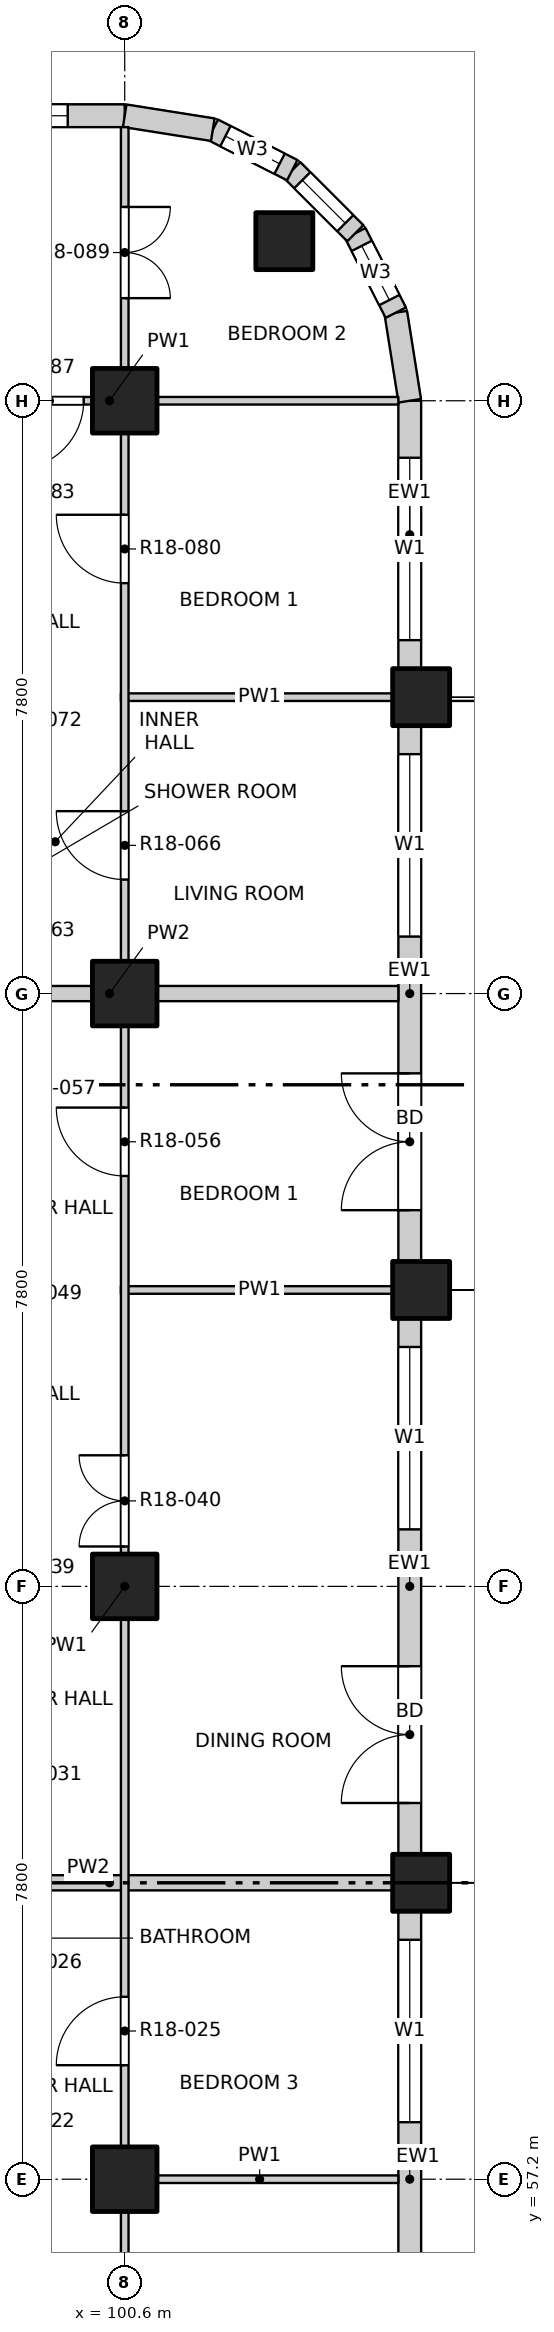
"""IFC4 building model, lengths in metres.
Left out: names, types, materials, properties, quantities, classifications, styles, units other than length and angle.
Written with IfcOpenShell. Run it as: python <this file> out.ifc"""

import sys

from ifc_helpers import new_model, si_unit, direction, frame, frame_2d, origin, origin_2d, place, context, subcontext, project, spatial, rectangle, extrude, element, fill, save


model = new_model("IFC4")
c1 = context("Model", 3, precision=1e-05, world=origin(), true_north=direction((0.0, 1.0)))
c2 = subcontext(c1, "Body", "Model", "MODEL_VIEW")
j1 = project(units=[si_unit("LENGTHUNIT", "METRE"), si_unit("PLANEANGLEUNIT", "RADIAN")], contexts=[c1])
p1 = place(None, origin())
s1 = spatial("IfcSite", under=j1, at=p1, CompositionType="ELEMENT")
p2 = place(p1, origin())
s2 = spatial("IfcBuilding", under=s1, at=p2, CompositionType="ELEMENT")
p3 = place(p2, frame((0.0, 0.0, 189.4)))
s3 = spatial("IfcBuildingStorey", under=s2, at=p3, CompositionType="ELEMENT", Elevation=189.4)
for number, where, z_axis, x_axis in (
    (1, (102.7, 82.7, -0.25), (0.0, 0.0, 1.0), (1.0, 0.0, 0.0)),
    (2, (104.5, 61.1, -0.25), (0.0, 0.0, 1.0), (1.0, 0.0, 0.0)),
    (3, (104.5, 68.9, -0.25), (0.0, 0.0, 1.0), (1.0, 0.0, 0.0)),
    (4, (104.5, 76.7, -0.25), (0.0, 0.0, 1.0), (1.0, 0.0, 0.0)),
):
    element("IfcColumn", number, at=place(p3, frame(where, z_axis=z_axis, x_axis=x_axis)), inside=s3, PredefinedType="COLUMN", context=c2, shape_type="SweptSolid", body=[
        extrude(rectangle(XDim=0.75, YDim=0.75, at=origin_2d()), origin(), (0.0, 0.0, 1.0), 3.35),
    ])
for number, where, z_axis, x_axis in (
    (5, (100.6, 57.2, -0.25), (0.0, 0.0, 1.0), (1.0, 0.0, 0.0)),
    (6, (100.6, 65.0, -0.25), (0.0, 0.0, 1.0), (1.0, 0.0, 0.0)),
    (7, (100.6, 72.8, -0.25), (0.0, 0.0, 1.0), (1.0, 0.0, 0.0)),
    (8, (100.6, 80.6, -0.25), (0.0, 0.0, 1.0), (1.0, 0.0, 0.0)),
):
    element("IfcColumn", number, at=place(p3, frame(where, z_axis=z_axis, x_axis=x_axis)), inside=s3, PredefinedType="COLUMN", context=c2, shape_type="SweptSolid", body=[
        extrude(rectangle(XDim=0.85, YDim=0.85, at=origin_2d()), origin(), (0.0, 0.0, 1.0), 3.35),
    ])
p4 = place(p3, frame((104.35, 53.675, 0.0), z_axis=(0.0, 0.0, 1.0), x_axis=(0.0, 1.0, 0.0)))
e9 = element("IfcWall", 9, at=p4, inside=s3, PredefinedType="SOLIDWALL", context=c2, shape_type="SweptSolid", body=[
    extrude(rectangle(XDim=7.05, YDim=0.3, at=frame_2d((3.525, 0.0))), origin(), (0.0, 0.0, 1.0), 3.1),
])
p5 = place(p4, frame((0.675, 0.0, 0.0)))
e10 = element("IfcOpeningElement", 10, at=p5, cuts=e9, PredefinedType="OPENING", context=c2, shape_type="SweptSolid", body=[
    extrude(rectangle(XDim=1.8, YDim=2.4, at=frame_2d((0.9, 1.2))), frame((0.0, 0.16, 0.0), z_axis=(0.0, -1.0, 0.0), x_axis=(1.0, 0.0, 0.0)), (0.0, 0.0, 1.0), 0.32),
])
p6 = place(p4, frame((4.275, 0.0, 0.9)))
e11 = element("IfcOpeningElement", 11, at=p6, cuts=e9, PredefinedType="OPENING", context=c2, shape_type="SweptSolid", body=[
    extrude(rectangle(XDim=2.4, YDim=1.8, at=frame_2d((1.2, 0.9))), frame((0.0, 0.16, 0.0), z_axis=(0.0, -1.0, 0.0), x_axis=(1.0, 0.0, 0.0)), (0.0, 0.0, 1.0), 0.32),
])
p7 = place(p3, frame((104.35, 61.475, 0.0), z_axis=(0.0, 0.0, 1.0), x_axis=(0.0, 1.0, 0.0)))
e12 = element("IfcWall", 12, at=p7, inside=s3, PredefinedType="SOLIDWALL", context=c2, shape_type="SweptSolid", body=[
    extrude(rectangle(XDim=7.05, YDim=0.3, at=frame_2d((3.525, 0.0))), origin(), (0.0, 0.0, 1.0), 3.1),
])
p8 = place(p7, frame((0.675, 0.0, 0.0)))
e13 = element("IfcOpeningElement", 13, at=p8, cuts=e12, PredefinedType="OPENING", context=c2, shape_type="SweptSolid", body=[
    extrude(rectangle(XDim=1.8, YDim=2.4, at=frame_2d((0.9, 1.2))), frame((0.0, 0.16, 0.0), z_axis=(0.0, -1.0, 0.0), x_axis=(1.0, 0.0, 0.0)), (0.0, 0.0, 1.0), 0.32),
])
p9 = place(p7, frame((4.275, 0.0, 0.9)))
e14 = element("IfcOpeningElement", 14, at=p9, cuts=e12, PredefinedType="OPENING", context=c2, shape_type="SweptSolid", body=[
    extrude(rectangle(XDim=2.4, YDim=1.8, at=frame_2d((1.2, 0.9))), frame((0.0, 0.16, 0.0), z_axis=(0.0, -1.0, 0.0), x_axis=(1.0, 0.0, 0.0)), (0.0, 0.0, 1.0), 0.32),
])
p10 = place(p3, frame((104.35, 69.275, 0.0), z_axis=(0.0, 0.0, 1.0), x_axis=(0.0, 1.0, 0.0)))
e15 = element("IfcWall", 15, at=p10, inside=s3, PredefinedType="SOLIDWALL", context=c2, shape_type="SweptSolid", body=[
    extrude(rectangle(XDim=7.05, YDim=0.3, at=frame_2d((3.525, 0.0))), origin(), (0.0, 0.0, 1.0), 3.1),
])
p11 = place(p10, frame((0.675, 0.0, 0.0)))
e16 = element("IfcOpeningElement", 16, at=p11, cuts=e15, PredefinedType="OPENING", context=c2, shape_type="SweptSolid", body=[
    extrude(rectangle(XDim=1.8, YDim=2.4, at=frame_2d((0.9, 1.2))), frame((0.0, 0.16, 0.0), z_axis=(0.0, -1.0, 0.0), x_axis=(1.0, 0.0, 0.0)), (0.0, 0.0, 1.0), 0.32),
])
p12 = place(p10, frame((4.275, 0.0, 0.9)))
e17 = element("IfcOpeningElement", 17, at=p12, cuts=e15, PredefinedType="OPENING", context=c2, shape_type="SweptSolid", body=[
    extrude(rectangle(XDim=2.4, YDim=1.8, at=frame_2d((1.2, 0.9))), frame((0.0, 0.16, 0.0), z_axis=(0.0, -1.0, 0.0), x_axis=(1.0, 0.0, 0.0)), (0.0, 0.0, 1.0), 0.32),
])
p13 = place(p3, frame((104.35, 77.075, 0.0), z_axis=(0.0, 0.0, 1.0), x_axis=(0.0, 1.0, 0.0)))
e18 = element("IfcWall", 18, at=p13, inside=s3, PredefinedType="SOLIDWALL", context=c2, shape_type="SweptSolid", body=[
    extrude(rectangle(XDim=3.525, YDim=0.3, at=frame_2d((1.763, 0.0))), origin(), (0.0, 0.0, 1.0), 3.1),
])
p14 = place(p13, frame((0.375, 0.0, 0.9)))
e19 = element("IfcOpeningElement", 19, at=p14, cuts=e18, PredefinedType="OPENING", context=c2, shape_type="SweptSolid", body=[
    extrude(rectangle(XDim=2.4, YDim=1.8, at=frame_2d((1.2, 0.9))), frame((0.0, 0.16, 0.0), z_axis=(0.0, -1.0, 0.0), x_axis=(1.0, 0.0, 0.0)), (0.0, 0.0, 1.0), 0.32),
])
p15 = place(p3, frame((97.075, 84.35, 0.0), z_axis=(0.0, 0.0, 1.0), x_axis=(1.0, 0.0, 0.0)))
e20 = element("IfcWall", 20, at=p15, inside=s3, PredefinedType="SOLIDWALL", context=c2, shape_type="SweptSolid", body=[
    extrude(rectangle(XDim=3.525, YDim=0.3, at=frame_2d((1.763, 0.0))), origin(), (0.0, 0.0, 1.0), 3.1),
])
p16 = place(p15, frame((0.375, 0.0, 0.9)))
e21 = element("IfcOpeningElement", 21, at=p16, cuts=e20, PredefinedType="OPENING", context=c2, shape_type="SweptSolid", body=[
    extrude(rectangle(XDim=2.4, YDim=1.8, at=frame_2d((1.2, 0.9))), frame((0.0, 0.16, 0.0), z_axis=(0.0, -1.0, 0.0), x_axis=(1.0, 0.0, 0.0)), (0.0, 0.0, 1.0), 0.32),
])
p17 = place(p3, frame((104.35, 80.6, 0.0), z_axis=(0.0, 0.0, 1.0), x_axis=(-0.156496880861, 0.987678452879, 0.0)))
e22 = element("IfcWall", 22, at=p17, inside=s3, PredefinedType="SOLIDWALL", context=c2, shape_type="SweptSolid", body=[
    extrude(rectangle(XDim=1.173, YDim=0.3, at=frame_2d((0.586, 0.0))), origin(), (0.0, 0.0, 1.0), 3.1),
])
p18 = place(p3, frame((104.167, 81.759, 0.0), z_axis=(0.0, 0.0, 1.0), x_axis=(-0.454025524128, 0.890988677504, 0.0)))
e23 = element("IfcWall", 23, at=p18, inside=s3, PredefinedType="SOLIDWALL", context=c2, shape_type="SweptSolid", body=[
    extrude(rectangle(XDim=1.173, YDim=0.3, at=frame_2d((0.587, 0.0))), origin(), (0.0, 0.0, 1.0), 3.1),
])
p19 = place(p18, frame((0.187, 0.0, 0.9)))
e24 = element("IfcOpeningElement", 24, at=p19, cuts=e23, PredefinedType="OPENING", context=c2, shape_type="SweptSolid", body=[
    extrude(rectangle(XDim=0.8, YDim=1.2, at=frame_2d((0.4, 0.6))), frame((0.0, 0.16, 0.0), z_axis=(0.0, -1.0, 0.0), x_axis=(1.0, 0.0, 0.0)), (0.0, 0.0, 1.0), 0.32),
])
p20 = place(p3, frame((103.634, 82.804, 0.0), z_axis=(0.0, 0.0, 1.0), x_axis=(-0.707106781187, 0.707106781187, 0.0)))
e25 = element("IfcWall", 25, at=p20, inside=s3, PredefinedType="SOLIDWALL", context=c2, shape_type="SweptSolid", body=[
    extrude(rectangle(XDim=1.173, YDim=0.3, at=frame_2d((0.586, 0.0))), origin(), (0.0, 0.0, 1.0), 3.1),
])
p21 = place(p20, frame((0.187, 0.0, 0.9)))
e26 = element("IfcOpeningElement", 26, at=p21, cuts=e25, PredefinedType="OPENING", context=c2, shape_type="SweptSolid", body=[
    extrude(rectangle(XDim=0.8, YDim=1.2, at=frame_2d((0.4, 0.6))), frame((0.0, 0.16, 0.0), z_axis=(0.0, -1.0, 0.0), x_axis=(1.0, 0.0, 0.0)), (0.0, 0.0, 1.0), 0.32),
])
p22 = place(p3, frame((102.804, 83.634, 0.0), z_axis=(0.0, 0.0, 1.0), x_axis=(-0.890988677504, 0.454025524128, 0.0)))
e27 = element("IfcWall", 27, at=p22, inside=s3, PredefinedType="SOLIDWALL", context=c2, shape_type="SweptSolid", body=[
    extrude(rectangle(XDim=1.173, YDim=0.3, at=frame_2d((0.587, 0.0))), origin(), (0.0, 0.0, 1.0), 3.1),
])
p23 = place(p22, frame((0.187, 0.0, 0.9)))
e28 = element("IfcOpeningElement", 28, at=p23, cuts=e27, PredefinedType="OPENING", context=c2, shape_type="SweptSolid", body=[
    extrude(rectangle(XDim=0.8, YDim=1.2, at=frame_2d((0.4, 0.6))), frame((0.0, 0.16, 0.0), z_axis=(0.0, -1.0, 0.0), x_axis=(1.0, 0.0, 0.0)), (0.0, 0.0, 1.0), 0.32),
])
p24 = place(p3, frame((101.759, 84.167, 0.0), z_axis=(0.0, 0.0, 1.0), x_axis=(-0.987678452879, 0.156496880861, 0.0)))
e29 = element("IfcWall", 29, at=p24, inside=s3, PredefinedType="SOLIDWALL", context=c2, shape_type="SweptSolid", body=[
    extrude(rectangle(XDim=1.173, YDim=0.3, at=frame_2d((0.586, 0.0))), origin(), (0.0, 0.0, 1.0), 3.1),
])
p25 = place(p3, frame((100.55, 57.2, 0.0), z_axis=(0.0, 0.0, 1.0), x_axis=(1.0, 0.0, 0.0)))
e30 = element("IfcWall", 30, at=p25, inside=s3, PredefinedType="PARTITIONING", context=c2, shape_type="SweptSolid", body=[
    extrude(rectangle(XDim=3.65, YDim=0.1, at=frame_2d((1.825, 0.0))), origin(), (0.0, 0.0, 1.0), 3.1),
])
p26 = place(p3, frame((96.6, 61.1, 0.0), z_axis=(0.0, 0.0, 1.0), x_axis=(1.0, 0.0, 0.0)))
e31 = element("IfcWall", 31, at=p26, inside=s3, PredefinedType="PARTITIONING", context=c2, shape_type="SweptSolid", body=[
    extrude(rectangle(XDim=7.6, YDim=0.2, at=frame_2d((3.8, 0.0))), origin(), (0.0, 0.0, 1.0), 3.1),
])
p27 = place(p3, frame((100.55, 68.9, 0.0), z_axis=(0.0, 0.0, 1.0), x_axis=(1.0, 0.0, 0.0)))
e32 = element("IfcWall", 32, at=p27, inside=s3, PredefinedType="PARTITIONING", context=c2, shape_type="SweptSolid", body=[
    extrude(rectangle(XDim=3.65, YDim=0.1, at=frame_2d((1.825, 0.0))), origin(), (0.0, 0.0, 1.0), 3.1),
])
p28 = place(p3, frame((96.6, 72.8, 0.0), z_axis=(0.0, 0.0, 1.0), x_axis=(1.0, 0.0, 0.0)))
e33 = element("IfcWall", 33, at=p28, inside=s3, PredefinedType="PARTITIONING", context=c2, shape_type="SweptSolid", body=[
    extrude(rectangle(XDim=7.6, YDim=0.2, at=frame_2d((3.8, 0.0))), origin(), (0.0, 0.0, 1.0), 3.1),
])
p29 = place(p3, frame((100.55, 76.7, 0.0), z_axis=(0.0, 0.0, 1.0), x_axis=(1.0, 0.0, 0.0)))
e34 = element("IfcWall", 34, at=p29, inside=s3, PredefinedType="PARTITIONING", context=c2, shape_type="SweptSolid", body=[
    extrude(rectangle(XDim=3.65, YDim=0.1, at=frame_2d((1.825, 0.0))), origin(), (0.0, 0.0, 1.0), 3.1),
])
p30 = place(p3, frame((96.6, 80.6, 0.0), z_axis=(0.0, 0.0, 1.0), x_axis=(1.0, 0.0, 0.0)))
e35 = element("IfcWall", 35, at=p30, inside=s3, PredefinedType="PARTITIONING", context=c2, shape_type="SweptSolid", body=[
    extrude(rectangle(XDim=7.6, YDim=0.1, at=frame_2d((3.8, 0.0))), origin(), (0.0, 0.0, 1.0), 3.1),
])
p31 = place(p30, frame((2.56, 0.0, 0.0)))
e36 = element("IfcOpeningElement", 36, at=p31, cuts=e35, PredefinedType="OPENING", context=c2, shape_type="SweptSolid", body=[
    extrude(rectangle(XDim=0.9, YDim=2.1, at=frame_2d((0.45, 1.05))), frame((0.0, 0.06, 0.0), z_axis=(0.0, -1.0, 0.0), x_axis=(1.0, 0.0, 0.0)), (0.0, 0.0, 1.0), 0.12),
])
p32 = place(p3, frame((100.6, 45.8, 0.0), z_axis=(0.0, 0.0, 1.0), x_axis=(0.0, 1.0, 0.0)))
e37 = element("IfcWall", 37, at=p32, inside=s3, PredefinedType="PARTITIONING", context=c2, shape_type="SweptSolid", body=[
    extrude(rectangle(XDim=38.4, YDim=0.1, at=frame_2d((19.2, 0.0))), origin(), (0.0, 0.0, 1.0), 3.1),
])
p33 = place(p32, frame((1.05, 0.0, 0.0)))
e38 = element("IfcOpeningElement", 38, at=p33, cuts=e37, PredefinedType="OPENING", context=c2, shape_type="SweptSolid", body=[
    extrude(rectangle(XDim=1.2, YDim=2.1, at=frame_2d((0.6, 1.05))), frame((0.0, 0.06, 0.0), z_axis=(0.0, -1.0, 0.0), x_axis=(1.0, 0.0, 0.0)), (0.0, 0.0, 1.0), 0.12),
])
p34 = place(p32, frame((5.1, 0.0, 0.0)))
e39 = element("IfcOpeningElement", 39, at=p34, cuts=e37, PredefinedType="OPENING", context=c2, shape_type="SweptSolid", body=[
    extrude(rectangle(XDim=0.9, YDim=2.1, at=frame_2d((0.45, 1.05))), frame((0.0, 0.06, 0.0), z_axis=(0.0, -1.0, 0.0), x_axis=(1.0, 0.0, 0.0)), (0.0, 0.0, 1.0), 0.12),
])
p35 = place(p32, frame((9.0, 0.0, 0.0)))
e40 = element("IfcOpeningElement", 40, at=p35, cuts=e37, PredefinedType="OPENING", context=c2, shape_type="SweptSolid", body=[
    extrude(rectangle(XDim=0.9, YDim=2.1, at=frame_2d((0.45, 1.05))), frame((0.0, 0.06, 0.0), z_axis=(0.0, -1.0, 0.0), x_axis=(1.0, 0.0, 0.0)), (0.0, 0.0, 1.0), 0.12),
])
p36 = place(p32, frame((12.9, 0.0, 0.0)))
e41 = element("IfcOpeningElement", 41, at=p36, cuts=e37, PredefinedType="OPENING", context=c2, shape_type="SweptSolid", body=[
    extrude(rectangle(XDim=0.9, YDim=2.1, at=frame_2d((0.45, 1.05))), frame((0.0, 0.06, 0.0), z_axis=(0.0, -1.0, 0.0), x_axis=(1.0, 0.0, 0.0)), (0.0, 0.0, 1.0), 0.12),
])
p37 = place(p32, frame((19.725, 0.0, 0.0)))
e42 = element("IfcOpeningElement", 42, at=p37, cuts=e37, PredefinedType="OPENING", context=c2, shape_type="SweptSolid", body=[
    extrude(rectangle(XDim=1.2, YDim=2.1, at=frame_2d((0.6, 1.05))), frame((0.0, 0.06, 0.0), z_axis=(0.0, -1.0, 0.0), x_axis=(1.0, 0.0, 0.0)), (0.0, 0.0, 1.0), 0.12),
])
p38 = place(p32, frame((24.6, 0.0, 0.0)))
e43 = element("IfcOpeningElement", 43, at=p38, cuts=e37, PredefinedType="OPENING", context=c2, shape_type="SweptSolid", body=[
    extrude(rectangle(XDim=0.9, YDim=2.1, at=frame_2d((0.45, 1.05))), frame((0.0, 0.06, 0.0), z_axis=(0.0, -1.0, 0.0), x_axis=(1.0, 0.0, 0.0)), (0.0, 0.0, 1.0), 0.12),
])
p39 = place(p32, frame((28.5, 0.0, 0.0)))
e44 = element("IfcOpeningElement", 44, at=p39, cuts=e37, PredefinedType="OPENING", context=c2, shape_type="SweptSolid", body=[
    extrude(rectangle(XDim=0.9, YDim=2.1, at=frame_2d((0.45, 1.05))), frame((0.0, 0.06, 0.0), z_axis=(0.0, -1.0, 0.0), x_axis=(1.0, 0.0, 0.0)), (0.0, 0.0, 1.0), 0.12),
])
p40 = place(p32, frame((32.4, 0.0, 0.0)))
e45 = element("IfcOpeningElement", 45, at=p40, cuts=e37, PredefinedType="OPENING", context=c2, shape_type="SweptSolid", body=[
    extrude(rectangle(XDim=0.9, YDim=2.1, at=frame_2d((0.45, 1.05))), frame((0.0, 0.06, 0.0), z_axis=(0.0, -1.0, 0.0), x_axis=(1.0, 0.0, 0.0)), (0.0, 0.0, 1.0), 0.12),
])
p41 = place(p32, frame((36.15, 0.0, 0.0)))
e46 = element("IfcOpeningElement", 46, at=p41, cuts=e37, PredefinedType="OPENING", context=c2, shape_type="SweptSolid", body=[
    extrude(rectangle(XDim=1.2, YDim=2.1, at=frame_2d((0.6, 1.05))), frame((0.0, 0.06, 0.0), z_axis=(0.0, -1.0, 0.0), x_axis=(1.0, 0.0, 0.0)), (0.0, 0.0, 1.0), 0.12),
])
p42 = place(p6, origin())
e47 = element("IfcWindow", 47, at=p42, inside=s3, PartitioningType="DOUBLE_PANEL_VERTICAL", PredefinedType="WINDOW", context=c2, shape_type="SweptSolid", body=[
    extrude(rectangle(XDim=2.4, YDim=1.8, at=frame_2d((1.2, 0.9))), frame((0.0, 0.03, 0.0), z_axis=(0.0, -1.0, 0.0), x_axis=(1.0, 0.0, 0.0)), (0.0, 0.0, 1.0), 0.06),
])
fill(e11, e47)
p43 = place(p8, origin())
e48 = element("IfcDoor", 48, at=p43, inside=s3, OperationType="DOUBLE_DOOR_SINGLE_SWING", PredefinedType="DOOR", context=c2, shape_type="SweptSolid", body=[
    extrude(rectangle(XDim=1.8, YDim=2.4, at=frame_2d((0.9, 1.2))), frame((0.0, 0.025, 0.0), z_axis=(0.0, -1.0, 0.0), x_axis=(1.0, 0.0, 0.0)), (0.0, 0.0, 1.0), 0.05),
])
fill(e13, e48)
p44 = place(p9, origin())
e49 = element("IfcWindow", 49, at=p44, inside=s3, PartitioningType="DOUBLE_PANEL_VERTICAL", PredefinedType="WINDOW", context=c2, shape_type="SweptSolid", body=[
    extrude(rectangle(XDim=2.4, YDim=1.8, at=frame_2d((1.2, 0.9))), frame((0.0, 0.03, 0.0), z_axis=(0.0, -1.0, 0.0), x_axis=(1.0, 0.0, 0.0)), (0.0, 0.0, 1.0), 0.06),
])
fill(e14, e49)
p45 = place(p11, origin())
e50 = element("IfcDoor", 50, at=p45, inside=s3, OperationType="DOUBLE_DOOR_SINGLE_SWING", PredefinedType="DOOR", context=c2, shape_type="SweptSolid", body=[
    extrude(rectangle(XDim=1.8, YDim=2.4, at=frame_2d((0.9, 1.2))), frame((0.0, 0.025, 0.0), z_axis=(0.0, -1.0, 0.0), x_axis=(1.0, 0.0, 0.0)), (0.0, 0.0, 1.0), 0.05),
])
fill(e16, e50)
p46 = place(p12, origin())
e51 = element("IfcWindow", 51, at=p46, inside=s3, PartitioningType="DOUBLE_PANEL_VERTICAL", PredefinedType="WINDOW", context=c2, shape_type="SweptSolid", body=[
    extrude(rectangle(XDim=2.4, YDim=1.8, at=frame_2d((1.2, 0.9))), frame((0.0, 0.03, 0.0), z_axis=(0.0, -1.0, 0.0), x_axis=(1.0, 0.0, 0.0)), (0.0, 0.0, 1.0), 0.06),
])
fill(e17, e51)
p47 = place(p14, origin())
e52 = element("IfcWindow", 52, at=p47, inside=s3, PartitioningType="DOUBLE_PANEL_VERTICAL", PredefinedType="WINDOW", context=c2, shape_type="SweptSolid", body=[
    extrude(rectangle(XDim=2.4, YDim=1.8, at=frame_2d((1.2, 0.9))), frame((0.0, 0.03, 0.0), z_axis=(0.0, -1.0, 0.0), x_axis=(1.0, 0.0, 0.0)), (0.0, 0.0, 1.0), 0.06),
])
fill(e19, e52)
p48 = place(p16, origin())
e53 = element("IfcWindow", 53, at=p48, inside=s3, PartitioningType="DOUBLE_PANEL_VERTICAL", PredefinedType="WINDOW", context=c2, shape_type="SweptSolid", body=[
    extrude(rectangle(XDim=2.4, YDim=1.8, at=frame_2d((1.2, 0.9))), frame((0.0, 0.03, 0.0), z_axis=(0.0, -1.0, 0.0), x_axis=(1.0, 0.0, 0.0)), (0.0, 0.0, 1.0), 0.06),
])
fill(e21, e53)
p49 = place(p19, origin())
e54 = element("IfcWindow", 54, at=p49, inside=s3, PartitioningType="SINGLE_PANEL", PredefinedType="WINDOW", context=c2, shape_type="SweptSolid", body=[
    extrude(rectangle(XDim=0.8, YDim=1.2, at=frame_2d((0.4, 0.6))), frame((0.0, 0.03, 0.0), z_axis=(0.0, -1.0, 0.0), x_axis=(1.0, 0.0, 0.0)), (0.0, 0.0, 1.0), 0.06),
])
fill(e24, e54)
p50 = place(p21, origin())
e55 = element("IfcWindow", 55, at=p50, inside=s3, PartitioningType="SINGLE_PANEL", PredefinedType="WINDOW", context=c2, shape_type="SweptSolid", body=[
    extrude(rectangle(XDim=0.8, YDim=1.2, at=frame_2d((0.4, 0.6))), frame((0.0, 0.03, 0.0), z_axis=(0.0, -1.0, 0.0), x_axis=(1.0, 0.0, 0.0)), (0.0, 0.0, 1.0), 0.06),
])
fill(e26, e55)
p51 = place(p23, origin())
e56 = element("IfcWindow", 56, at=p51, inside=s3, PartitioningType="SINGLE_PANEL", PredefinedType="WINDOW", context=c2, shape_type="SweptSolid", body=[
    extrude(rectangle(XDim=0.8, YDim=1.2, at=frame_2d((0.4, 0.6))), frame((0.0, 0.03, 0.0), z_axis=(0.0, -1.0, 0.0), x_axis=(1.0, 0.0, 0.0)), (0.0, 0.0, 1.0), 0.06),
])
fill(e28, e56)
p52 = place(p36, origin())
e57 = element("IfcDoor", 57, at=p52, inside=s3, OperationType="SINGLE_SWING_LEFT", PredefinedType="DOOR", context=c2, shape_type="SweptSolid", body=[
    extrude(rectangle(XDim=0.9, YDim=2.1, at=frame_2d((0.45, 1.05))), frame((0.0, 0.025, 0.0), z_axis=(0.0, -1.0, 0.0), x_axis=(1.0, 0.0, 0.0)), (0.0, 0.0, 1.0), 0.05),
])
fill(e41, e57)
p53 = place(p37, origin())
e58 = element("IfcDoor", 58, at=p53, inside=s3, OperationType="DOUBLE_DOOR_SINGLE_SWING", PredefinedType="DOOR", context=c2, shape_type="SweptSolid", body=[
    extrude(rectangle(XDim=1.2, YDim=2.1, at=frame_2d((0.6, 1.05))), frame((0.0, 0.025, 0.0), z_axis=(0.0, -1.0, 0.0), x_axis=(1.0, 0.0, 0.0)), (0.0, 0.0, 1.0), 0.05),
])
fill(e42, e58)
p54 = place(p38, origin())
e59 = element("IfcDoor", 59, at=p54, inside=s3, OperationType="SINGLE_SWING_RIGHT", PredefinedType="DOOR", context=c2, shape_type="SweptSolid", body=[
    extrude(rectangle(XDim=0.9, YDim=2.1, at=frame_2d((0.45, 1.05))), frame((0.0, 0.025, 0.0), z_axis=(0.0, -1.0, 0.0), x_axis=(1.0, 0.0, 0.0)), (0.0, 0.0, 1.0), 0.05),
])
fill(e43, e59)
p55 = place(p39, origin())
e60 = element("IfcDoor", 60, at=p55, inside=s3, OperationType="SINGLE_SWING_RIGHT", PredefinedType="DOOR", context=c2, shape_type="SweptSolid", body=[
    extrude(rectangle(XDim=0.9, YDim=2.1, at=frame_2d((0.45, 1.05))), frame((0.0, 0.025, 0.0), z_axis=(0.0, -1.0, 0.0), x_axis=(1.0, 0.0, 0.0)), (0.0, 0.0, 1.0), 0.05),
])
fill(e44, e60)
p56 = place(p40, origin())
e61 = element("IfcDoor", 61, at=p56, inside=s3, OperationType="SINGLE_SWING_RIGHT", PredefinedType="DOOR", context=c2, shape_type="SweptSolid", body=[
    extrude(rectangle(XDim=0.9, YDim=2.1, at=frame_2d((0.45, 1.05))), frame((0.0, 0.025, 0.0), z_axis=(0.0, -1.0, 0.0), x_axis=(1.0, 0.0, 0.0)), (0.0, 0.0, 1.0), 0.05),
])
fill(e45, e61)
p57 = place(p31, origin())
e62 = element("IfcDoor", 62, at=p57, inside=s3, OperationType="SINGLE_SWING_RIGHT", PredefinedType="DOOR", context=c2, shape_type="SweptSolid", body=[
    extrude(rectangle(XDim=0.9, YDim=2.1, at=frame_2d((0.45, 1.05))), frame((0.0, 0.025, 0.0), z_axis=(0.0, -1.0, 0.0), x_axis=(1.0, 0.0, 0.0)), (0.0, 0.0, 1.0), 0.05),
])
fill(e36, e62)
p58 = place(p41, origin())
e63 = element("IfcDoor", 63, at=p58, inside=s3, OperationType="DOUBLE_DOOR_SINGLE_SWING", PredefinedType="DOOR", context=c2, shape_type="SweptSolid", body=[
    extrude(rectangle(XDim=1.2, YDim=2.1, at=frame_2d((0.6, 1.05))), frame((0.0, 0.025, 0.0), z_axis=(0.0, -1.0, 0.0), x_axis=(1.0, 0.0, 0.0)), (0.0, 0.0, 1.0), 0.05),
])
fill(e46, e63)
save(model, sys.argv[1])
